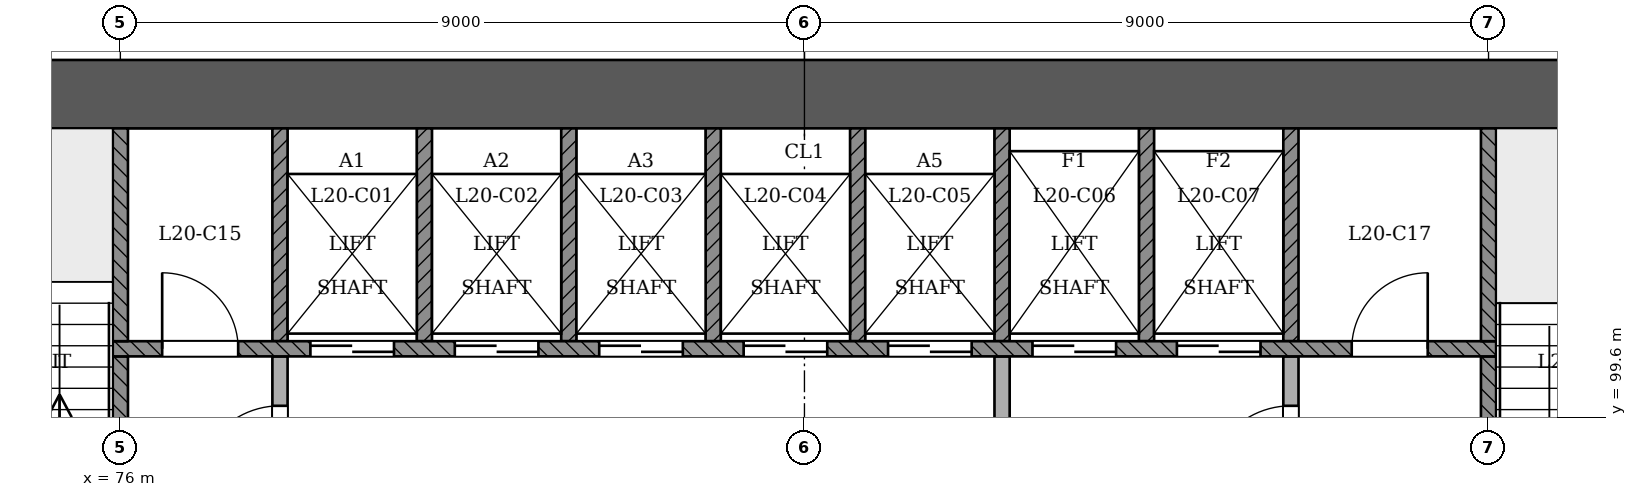
"""IFC4 building model, lengths in metres.
Left out: names, types, materials, properties, quantities, classifications, styles, units other than length and angle.
Written with IfcOpenShell. Run it as: python <this file> out.ifc"""

import sys

from ifc_helpers import new_model, si_unit, direction, frame, frame_2d, origin, place, context, subcontext, project, spatial, rectangle, extrude, element, fill, save


model = new_model("IFC4")
c1 = context("Model", 3, precision=1e-05, world=origin(), true_north=direction((0.0, 1.0)))
c2 = subcontext(c1, "Body", "Model", "MODEL_VIEW")
j1 = project(units=[si_unit("LENGTHUNIT", "METRE"), si_unit("PLANEANGLEUNIT", "RADIAN")], contexts=[c1])
p1 = place(None, origin())
s1 = spatial("IfcSite", under=j1, at=p1, CompositionType="ELEMENT")
p2 = place(p1, origin())
s2 = spatial("IfcBuilding", under=s1, at=p2, CompositionType="ELEMENT")
p3 = place(p2, frame((0.0, 0.0, 81.0)))
s3 = spatial("IfcBuildingStorey", under=s2, at=p3, CompositionType="ELEMENT", Elevation=81.0)
p4 = place(p3, frame((97.45, 103.85, 0.0), z_axis=(0.0, 0.0, 1.0), x_axis=(-1.0, 0.0, 0.0)))
e1 = element("IfcWall", 1, at=p4, inside=s3, PredefinedType="SHEAR", context=c2, shape_type="SweptSolid", body=[
    extrude(rectangle(XDim=25.35, YDim=0.9, at=frame_2d((12.675, 0.0))), origin(), (0.0, 0.0, 1.0), 3.6),
])
p5 = place(p3, frame((87.6, 93.4, 0.0), z_axis=(0.0, 0.0, 1.0), x_axis=(0.0, 1.0, 0.0)))
e2 = element("IfcWall", 2, at=p5, inside=s3, PredefinedType="PARTITIONING", context=c2, shape_type="SweptSolid", body=[
    extrude(rectangle(XDim=7.0, YDim=0.2, at=frame_2d((3.5, 0.0))), origin(), (0.0, 0.0, 1.0), 3.1),
])
p6 = place(p5, frame((4.45, 0.0, 0.0)))
e3 = element("IfcOpeningElement", 3, at=p6, cuts=e2, PredefinedType="OPENING", context=c2, shape_type="SweptSolid", body=[
    extrude(rectangle(XDim=1.1, YDim=2.1, at=frame_2d((0.55, 1.05))), frame((0.0, 0.11, 0.0), z_axis=(0.0, -1.0, 0.0), x_axis=(1.0, 0.0, 0.0)), (0.0, 0.0, 1.0), 0.221),
])
p7 = place(p3, frame((91.4, 96.2, 0.0), z_axis=(0.0, 0.0, 1.0), x_axis=(0.0, 1.0, 0.0)))
e4 = element("IfcWall", 4, at=p7, inside=s3, PredefinedType="PARTITIONING", context=c2, shape_type="SweptSolid", body=[
    extrude(rectangle(XDim=4.2, YDim=0.2, at=frame_2d((2.1, 0.0))), origin(), (0.0, 0.0, 1.0), 3.1),
])
p8 = place(p7, frame((2.45, 0.0, 0.0)))
e5 = element("IfcOpeningElement", 5, at=p8, cuts=e4, PredefinedType="OPENING", context=c2, shape_type="SweptSolid", body=[
    extrude(rectangle(XDim=1.1, YDim=2.1, at=frame_2d((0.55, 1.05))), frame((0.0, 0.11, 0.0), z_axis=(0.0, -1.0, 0.0), x_axis=(1.0, 0.0, 0.0)), (0.0, 0.0, 1.0), 0.221),
])
p9 = place(p3, frame((76.0, 96.7, 0.0), z_axis=(0.0, 0.0, 1.0), x_axis=(0.0, 1.0, 0.0)))
e6 = element("IfcWall", 6, at=p9, inside=s3, PredefinedType="SOLIDWALL", context=c2, shape_type="SweptSolid", body=[
    extrude(rectangle(XDim=3.7, YDim=0.2, at=frame_2d((1.85, 0.0))), origin(), (0.0, 0.0, 1.0), 3.1),
])
p10 = place(p9, frame((0.35, 0.0, 0.0)))
e7 = element("IfcOpeningElement", 7, at=p10, cuts=e6, PredefinedType="OPENING", context=c2, shape_type="SweptSolid", body=[
    extrude(rectangle(XDim=1.1, YDim=2.1, at=frame_2d((0.55, 1.05))), frame((0.0, 0.11, 0.0), z_axis=(0.0, -1.0, 0.0), x_axis=(1.0, 0.0, 0.0)), (0.0, 0.0, 1.0), 0.221),
])
p11 = place(p3, frame((78.1, 96.7, 0.0), z_axis=(0.0, 0.0, 1.0), x_axis=(0.0, 1.0, 0.0)))
e8 = element("IfcWall", 8, at=p11, inside=s3, PredefinedType="PARTITIONING", context=c2, shape_type="SweptSolid", body=[
    extrude(rectangle(XDim=3.7, YDim=0.2, at=frame_2d((1.85, 0.0))), origin(), (0.0, 0.0, 1.0), 3.1),
])
p12 = place(p11, frame((1.95, 0.0, 0.0)))
e9 = element("IfcOpeningElement", 9, at=p12, cuts=e8, PredefinedType="OPENING", context=c2, shape_type="SweptSolid", body=[
    extrude(rectangle(XDim=1.1, YDim=2.1, at=frame_2d((0.55, 1.05))), frame((0.0, 0.11, 0.0), z_axis=(0.0, -1.0, 0.0), x_axis=(1.0, 0.0, 0.0)), (0.0, 0.0, 1.0), 0.221),
])
p13 = place(p3, frame((94.0, 96.7, 0.0), z_axis=(0.0, 0.0, 1.0), x_axis=(0.0, 1.0, 0.0)))
e10 = element("IfcWall", 10, at=p13, inside=s3, PredefinedType="SOLIDWALL", context=c2, shape_type="SweptSolid", body=[
    extrude(rectangle(XDim=3.7, YDim=0.2, at=frame_2d((1.85, 0.0))), origin(), (0.0, 0.0, 1.0), 3.1),
])
p14 = place(p13, frame((0.35, 0.0, 0.0)))
e11 = element("IfcOpeningElement", 11, at=p14, cuts=e10, PredefinedType="OPENING", context=c2, shape_type="SweptSolid", body=[
    extrude(rectangle(XDim=1.1, YDim=2.1, at=frame_2d((0.55, 1.05))), frame((0.0, 0.11, 0.0), z_axis=(0.0, -1.0, 0.0), x_axis=(1.0, 0.0, 0.0)), (0.0, 0.0, 1.0), 0.221),
])
p15 = place(p3, frame((75.9, 100.5, 0.0), z_axis=(0.0, 0.0, 1.0), x_axis=(1.0, 0.0, 0.0)))
e12 = element("IfcWall", 12, at=p15, inside=s3, PredefinedType="SOLIDWALL", context=c2, shape_type="SweptSolid", body=[
    extrude(rectangle(XDim=18.2, YDim=0.2, at=frame_2d((9.1, 0.0))), origin(), (0.0, 0.0, 1.0), 3.1),
])
p16 = place(p15, frame((2.6, 0.0, 0.0)))
e13 = element("IfcOpeningElement", 13, at=p16, cuts=e12, PredefinedType="OPENING", context=c2, shape_type="SweptSolid", body=[
    extrude(rectangle(XDim=1.1, YDim=2.1, at=frame_2d((0.55, 1.05))), frame((0.0, 0.11, 0.0), z_axis=(0.0, -1.0, 0.0), x_axis=(1.0, 0.0, 0.0)), (0.0, 0.0, 1.0), 0.221),
])
p17 = place(p15, frame((4.5, 0.0, 0.0)))
e14 = element("IfcOpeningElement", 14, at=p17, cuts=e12, PredefinedType="OPENING", context=c2, shape_type="SweptSolid", body=[
    extrude(rectangle(XDim=1.1, YDim=2.1, at=frame_2d((0.55, 1.05))), frame((0.0, 0.11, 0.0), z_axis=(0.0, -1.0, 0.0), x_axis=(1.0, 0.0, 0.0)), (0.0, 0.0, 1.0), 0.221),
])
p18 = place(p15, frame((6.4, 0.0, 0.0)))
e15 = element("IfcOpeningElement", 15, at=p18, cuts=e12, PredefinedType="OPENING", context=c2, shape_type="SweptSolid", body=[
    extrude(rectangle(XDim=1.1, YDim=2.1, at=frame_2d((0.55, 1.05))), frame((0.0, 0.11, 0.0), z_axis=(0.0, -1.0, 0.0), x_axis=(1.0, 0.0, 0.0)), (0.0, 0.0, 1.0), 0.221),
])
p19 = place(p15, frame((8.3, 0.0, 0.0)))
e16 = element("IfcOpeningElement", 16, at=p19, cuts=e12, PredefinedType="OPENING", context=c2, shape_type="SweptSolid", body=[
    extrude(rectangle(XDim=1.1, YDim=2.1, at=frame_2d((0.55, 1.05))), frame((0.0, 0.11, 0.0), z_axis=(0.0, -1.0, 0.0), x_axis=(1.0, 0.0, 0.0)), (0.0, 0.0, 1.0), 0.221),
])
p20 = place(p15, frame((10.2, 0.0, 0.0)))
e17 = element("IfcOpeningElement", 17, at=p20, cuts=e12, PredefinedType="OPENING", context=c2, shape_type="SweptSolid", body=[
    extrude(rectangle(XDim=1.1, YDim=2.1, at=frame_2d((0.55, 1.05))), frame((0.0, 0.11, 0.0), z_axis=(0.0, -1.0, 0.0), x_axis=(1.0, 0.0, 0.0)), (0.0, 0.0, 1.0), 0.221),
])
p21 = place(p15, frame((12.1, 0.0, 0.0)))
e18 = element("IfcOpeningElement", 18, at=p21, cuts=e12, PredefinedType="OPENING", context=c2, shape_type="SweptSolid", body=[
    extrude(rectangle(XDim=1.1, YDim=2.1, at=frame_2d((0.55, 1.05))), frame((0.0, 0.11, 0.0), z_axis=(0.0, -1.0, 0.0), x_axis=(1.0, 0.0, 0.0)), (0.0, 0.0, 1.0), 0.221),
])
p22 = place(p15, frame((14.0, 0.0, 0.0)))
e19 = element("IfcOpeningElement", 19, at=p22, cuts=e12, PredefinedType="OPENING", context=c2, shape_type="SweptSolid", body=[
    extrude(rectangle(XDim=1.1, YDim=2.1, at=frame_2d((0.55, 1.05))), frame((0.0, 0.11, 0.0), z_axis=(0.0, -1.0, 0.0), x_axis=(1.0, 0.0, 0.0)), (0.0, 0.0, 1.0), 0.221),
])
p23 = place(p15, frame((0.65, 0.0, 0.0)))
e20 = element("IfcOpeningElement", 20, at=p23, cuts=e12, PredefinedType="OPENING", context=c2, shape_type="SweptSolid", body=[
    extrude(rectangle(XDim=1.0, YDim=2.1, at=frame_2d((0.5, 1.05))), frame((0.0, 0.11, 0.0), z_axis=(0.0, -1.0, 0.0), x_axis=(1.0, 0.0, 0.0)), (0.0, 0.0, 1.0), 0.221),
])
p24 = place(p15, frame((16.3, 0.0, 0.0)))
e21 = element("IfcOpeningElement", 21, at=p24, cuts=e12, PredefinedType="OPENING", context=c2, shape_type="SweptSolid", body=[
    extrude(rectangle(XDim=1.0, YDim=2.1, at=frame_2d((0.5, 1.05))), frame((0.0, 0.11, 0.0), z_axis=(0.0, -1.0, 0.0), x_axis=(1.0, 0.0, 0.0)), (0.0, 0.0, 1.0), 0.221),
])
for number, where, z_axis, x_axis in (
    (22, (76.0, 100.6, 0.0), (0.0, 0.0, 1.0), (0.0, 1.0, 0.0)),
    (23, (78.1, 100.6, 0.0), (0.0, 0.0, 1.0), (0.0, 1.0, 0.0)),
    (24, (80.0, 100.6, 0.0), (0.0, 0.0, 1.0), (0.0, 1.0, 0.0)),
    (25, (81.9, 100.6, 0.0), (0.0, 0.0, 1.0), (0.0, 1.0, 0.0)),
    (26, (83.8, 100.6, 0.0), (0.0, 0.0, 1.0), (0.0, 1.0, 0.0)),
    (27, (85.7, 100.6, 0.0), (0.0, 0.0, 1.0), (0.0, 1.0, 0.0)),
    (28, (87.6, 100.6, 0.0), (0.0, 0.0, 1.0), (0.0, 1.0, 0.0)),
    (29, (89.5, 100.6, 0.0), (0.0, 0.0, 1.0), (0.0, 1.0, 0.0)),
    (30, (91.4, 100.6, 0.0), (0.0, 0.0, 1.0), (0.0, 1.0, 0.0)),
    (31, (94.0, 100.6, 0.0), (0.0, 0.0, 1.0), (0.0, 1.0, 0.0)),
):
    element("IfcWall", number, at=place(p3, frame(where, z_axis=z_axis, x_axis=x_axis)), inside=s3, PredefinedType="SOLIDWALL", context=c2, shape_type="SweptSolid", body=[
        extrude(rectangle(XDim=2.8, YDim=0.2, at=frame_2d((1.4, 0.0))), origin(), (0.0, 0.0, 1.0), 3.1),
    ])
p25 = place(p16, origin())
e32 = element("IfcDoor", 32, at=p25, inside=s3, OperationType="SLIDING_TO_RIGHT", PredefinedType="NOTDEFINED", context=c2, shape_type="SweptSolid", body=[
    extrude(rectangle(XDim=1.1, YDim=2.1, at=frame_2d((0.55, 1.05))), frame((0.0, 0.025, 0.0), z_axis=(0.0, -1.0, 0.0), x_axis=(1.0, 0.0, 0.0)), (0.0, 0.0, 1.0), 0.05),
])
fill(e13, e32)
p26 = place(p17, origin())
e33 = element("IfcDoor", 33, at=p26, inside=s3, OperationType="SLIDING_TO_LEFT", PredefinedType="NOTDEFINED", context=c2, shape_type="SweptSolid", body=[
    extrude(rectangle(XDim=1.1, YDim=2.1, at=frame_2d((0.55, 1.05))), frame((0.0, 0.025, 0.0), z_axis=(0.0, -1.0, 0.0), x_axis=(1.0, 0.0, 0.0)), (0.0, 0.0, 1.0), 0.05),
])
fill(e14, e33)
p27 = place(p18, origin())
e34 = element("IfcDoor", 34, at=p27, inside=s3, OperationType="SLIDING_TO_RIGHT", PredefinedType="NOTDEFINED", context=c2, shape_type="SweptSolid", body=[
    extrude(rectangle(XDim=1.1, YDim=2.1, at=frame_2d((0.55, 1.05))), frame((0.0, 0.025, 0.0), z_axis=(0.0, -1.0, 0.0), x_axis=(1.0, 0.0, 0.0)), (0.0, 0.0, 1.0), 0.05),
])
fill(e15, e34)
p28 = place(p19, origin())
e35 = element("IfcDoor", 35, at=p28, inside=s3, OperationType="SLIDING_TO_LEFT", PredefinedType="NOTDEFINED", context=c2, shape_type="SweptSolid", body=[
    extrude(rectangle(XDim=1.1, YDim=2.1, at=frame_2d((0.55, 1.05))), frame((0.0, 0.025, 0.0), z_axis=(0.0, -1.0, 0.0), x_axis=(1.0, 0.0, 0.0)), (0.0, 0.0, 1.0), 0.05),
])
fill(e16, e35)
p29 = place(p20, origin())
e36 = element("IfcDoor", 36, at=p29, inside=s3, OperationType="SLIDING_TO_RIGHT", PredefinedType="NOTDEFINED", context=c2, shape_type="SweptSolid", body=[
    extrude(rectangle(XDim=1.1, YDim=2.1, at=frame_2d((0.55, 1.05))), frame((0.0, 0.025, 0.0), z_axis=(0.0, -1.0, 0.0), x_axis=(1.0, 0.0, 0.0)), (0.0, 0.0, 1.0), 0.05),
])
fill(e17, e36)
p30 = place(p21, origin())
e37 = element("IfcDoor", 37, at=p30, inside=s3, OperationType="SLIDING_TO_RIGHT", PredefinedType="NOTDEFINED", context=c2, shape_type="SweptSolid", body=[
    extrude(rectangle(XDim=1.1, YDim=2.1, at=frame_2d((0.55, 1.05))), frame((0.0, 0.025, 0.0), z_axis=(0.0, -1.0, 0.0), x_axis=(1.0, 0.0, 0.0)), (0.0, 0.0, 1.0), 0.05),
])
fill(e18, e37)
p31 = place(p22, origin())
e38 = element("IfcDoor", 38, at=p31, inside=s3, OperationType="SLIDING_TO_LEFT", PredefinedType="NOTDEFINED", context=c2, shape_type="SweptSolid", body=[
    extrude(rectangle(XDim=1.1, YDim=2.1, at=frame_2d((0.55, 1.05))), frame((0.0, 0.025, 0.0), z_axis=(0.0, -1.0, 0.0), x_axis=(1.0, 0.0, 0.0)), (0.0, 0.0, 1.0), 0.05),
])
fill(e19, e38)
p32 = place(p12, origin())
e39 = element("IfcDoor", 39, at=p32, inside=s3, OperationType="SINGLE_SWING_LEFT", PredefinedType="NOTDEFINED", context=c2, shape_type="SweptSolid", body=[
    extrude(rectangle(XDim=1.1, YDim=2.1, at=frame_2d((0.55, 1.05))), frame((0.0, 0.025, 0.0), z_axis=(0.0, -1.0, 0.0), x_axis=(1.0, 0.0, 0.0)), (0.0, 0.0, 1.0), 0.05),
])
fill(e9, e39)
p33 = place(p8, origin())
e40 = element("IfcDoor", 40, at=p33, inside=s3, OperationType="SINGLE_SWING_LEFT", PredefinedType="NOTDEFINED", context=c2, shape_type="SweptSolid", body=[
    extrude(rectangle(XDim=1.1, YDim=2.1, at=frame_2d((0.55, 1.05))), frame((0.0, 0.025, 0.0), z_axis=(0.0, -1.0, 0.0), x_axis=(1.0, 0.0, 0.0)), (0.0, 0.0, 1.0), 0.05),
])
fill(e5, e40)
p34 = place(p23, origin())
e41 = element("IfcDoor", 41, at=p34, inside=s3, OperationType="SINGLE_SWING_LEFT", PredefinedType="NOTDEFINED", context=c2, shape_type="SweptSolid", body=[
    extrude(rectangle(XDim=1.0, YDim=2.1, at=frame_2d((0.5, 1.05))), frame((0.0, 0.025, 0.0), z_axis=(0.0, -1.0, 0.0), x_axis=(1.0, 0.0, 0.0)), (0.0, 0.0, 1.0), 0.05),
])
fill(e20, e41)
p35 = place(p24, origin())
e42 = element("IfcDoor", 42, at=p35, inside=s3, OperationType="SINGLE_SWING_RIGHT", PredefinedType="NOTDEFINED", context=c2, shape_type="SweptSolid", body=[
    extrude(rectangle(XDim=1.0, YDim=2.1, at=frame_2d((0.5, 1.05))), frame((0.0, 0.025, 0.0), z_axis=(0.0, -1.0, 0.0), x_axis=(1.0, 0.0, 0.0)), (0.0, 0.0, 1.0), 0.05),
])
fill(e21, e42)
save(model, sys.argv[1])
